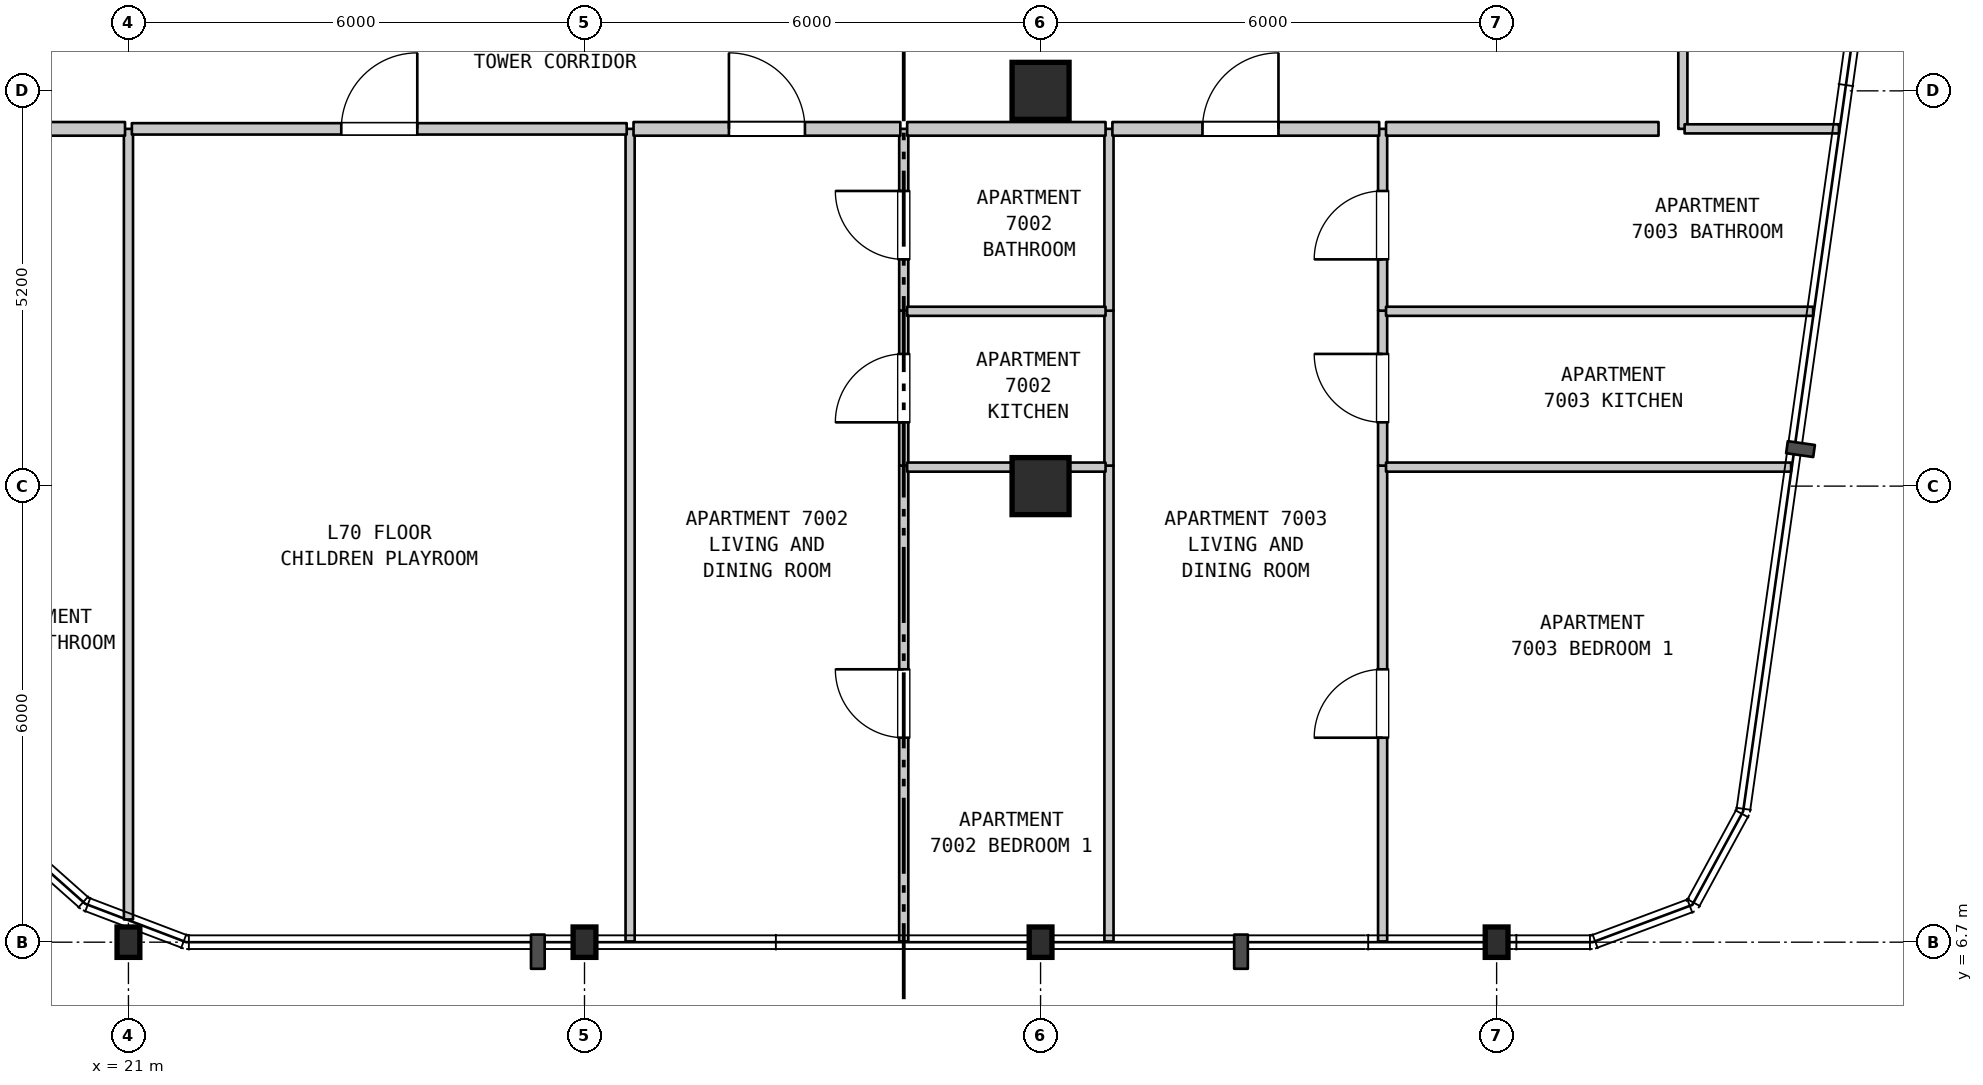
"""IFC4 building model, lengths in metres.
Left out: names, types, materials, properties, quantities, classifications, styles, units other than length and angle.
Written with IfcOpenShell. Run it as: python <this file> out.ifc"""

import sys

from ifc_helpers import new_model, si_unit, direction, frame, frame_2d, origin, origin_2d, place, context, subcontext, project, spatial, rectangle, i_section, extrude, element, fill, save


model = new_model("IFC4")
c1 = context("Model", 3, precision=1e-05, world=origin(), true_north=direction((0.0, 1.0)))
c2 = subcontext(c1, "Body", "Model", "MODEL_VIEW")
j1 = project(units=[si_unit("LENGTHUNIT", "METRE"), si_unit("PLANEANGLEUNIT", "RADIAN")], contexts=[c1])
p1 = place(None, origin())
s1 = spatial("IfcSite", under=j1, at=p1, CompositionType="ELEMENT")
p2 = place(p1, origin())
s2 = spatial("IfcBuilding", under=s1, at=p2, CompositionType="ELEMENT")
p3 = place(p2, frame((0.0, 0.0, 280.6)))
s3 = spatial("IfcBuildingStorey", under=s2, at=p3, CompositionType="ELEMENT", Elevation=280.6)
for number, where, z_axis, x_axis in (
    (1, (21.0, 6.7, 0.0), (0.0, 0.0, 1.0), (1.0, 0.0, 0.0)),
    (2, (27.0, 6.7, 0.0), (0.0, 0.0, 1.0), (1.0, 0.0, 0.0)),
    (3, (33.0, 6.7, 0.0), (0.0, 0.0, 1.0), (1.0, 0.0, 0.0)),
):
    element("IfcColumn", number, at=place(p3, frame(where, z_axis=z_axis, x_axis=x_axis)), inside=s3, PredefinedType="COLUMN", context=c2, shape_type="SweptSolid", body=[
        extrude(i_section(OverallWidth=0.3, OverallDepth=0.4, WebThickness=0.013, FlangeThickness=0.024, FilletRadius=0.027, at=origin_2d()), origin(), (0.0, 0.0, 1.0), 3.7),
    ])
for number, where, z_axis, x_axis in (
    (4, (33.0, 12.7, 0.0), (0.0, 0.0, 1.0), (1.0, 0.0, 0.0)),
    (5, (33.0, 17.9, 0.0), (0.0, 0.0, 1.0), (1.0, 0.0, 0.0)),
):
    element("IfcColumn", number, at=place(p3, frame(where, z_axis=z_axis, x_axis=x_axis)), inside=s3, PredefinedType="COLUMN", context=c2, shape_type="SweptSolid", body=[
        extrude(rectangle(XDim=0.75, YDim=0.75, at=origin_2d()), origin(), (0.0, 0.0, 1.0), 3.7),
    ])
p4 = place(p3, frame((39.0, 6.7, 0.0), z_axis=(0.0, 0.0, 1.0), x_axis=(1.0, 0.0, 0.0)))
e6 = element("IfcColumn", 6, at=p4, inside=s3, PredefinedType="COLUMN", context=c2, shape_type="SweptSolid", body=[
    extrude(i_section(OverallWidth=0.3, OverallDepth=0.4, WebThickness=0.013, FlangeThickness=0.024, FilletRadius=0.027, at=origin_2d()), origin(), (0.0, 0.0, 1.0), 3.7),
])
p5 = place(p3, frame((21.0, 6.999, 0.0), z_axis=(0.0, 0.0, 1.0), x_axis=(0.0, 1.0, 0.0)))
e7 = element("IfcWall", 7, at=p5, inside=s3, PredefinedType="PARTITIONING", context=c2, shape_type="SweptSolid", body=[
    extrude(rectangle(XDim=10.401, YDim=0.12, at=frame_2d((5.2, 0.0))), origin(), (0.0, 0.0, 1.0), 3.39),
])
p6 = place(p3, frame((27.6, 6.71, 0.0), z_axis=(0.0, 0.0, 1.0), x_axis=(0.0, 1.0, 0.0)))
e8 = element("IfcWall", 8, at=p6, inside=s3, PredefinedType="PARTITIONING", context=c2, shape_type="SweptSolid", body=[
    extrude(rectangle(XDim=10.69, YDim=0.12, at=frame_2d((5.345, 0.0))), origin(), (0.0, 0.0, 1.0), 3.39),
])
p7 = place(p3, frame((31.2, 6.71, 0.0), z_axis=(0.0, 0.0, 1.0), x_axis=(0.0, 1.0, 0.0)))
e9 = element("IfcWall", 9, at=p7, inside=s3, PredefinedType="PARTITIONING", context=c2, shape_type="SweptSolid", body=[
    extrude(rectangle(XDim=6.26, YDim=0.12, at=frame_2d((3.13, 0.0))), origin(), (0.0, 0.0, 1.0), 3.39),
])
p8 = place(p7, frame((2.68, 0.0, 0.0)))
e10 = element("IfcOpeningElement", 10, at=p8, cuts=e9, PredefinedType="OPENING", context=c2, shape_type="SweptSolid", body=[
    extrude(rectangle(XDim=0.9, YDim=2.15, at=frame_2d((0.45, 1.075))), frame((0.0, 0.07, 0.0), z_axis=(0.0, -1.0, 0.0), x_axis=(1.0, 0.0, 0.0)), (0.0, 0.0, 1.0), 0.14),
])
p9 = place(p3, frame((31.2, 12.97, 0.0), z_axis=(0.0, 0.0, 1.0), x_axis=(0.0, 1.0, 0.0)))
e11 = element("IfcWall", 11, at=p9, inside=s3, PredefinedType="PARTITIONING", context=c2, shape_type="SweptSolid", body=[
    extrude(rectangle(XDim=2.038, YDim=0.12, at=frame_2d((1.019, 0.0))), origin(), (0.0, 0.0, 1.0), 3.39),
])
p10 = place(p9, frame((0.569, 0.0, 0.0)))
e12 = element("IfcOpeningElement", 12, at=p10, cuts=e11, PredefinedType="OPENING", context=c2, shape_type="SweptSolid", body=[
    extrude(rectangle(XDim=0.9, YDim=2.15, at=frame_2d((0.45, 1.075))), frame((0.0, 0.07, 0.0), z_axis=(0.0, -1.0, 0.0), x_axis=(1.0, 0.0, 0.0)), (0.0, 0.0, 1.0), 0.14),
])
p11 = place(p3, frame((31.2, 15.008, 0.0), z_axis=(0.0, 0.0, 1.0), x_axis=(0.0, 1.0, 0.0)))
e13 = element("IfcWall", 13, at=p11, inside=s3, PredefinedType="PARTITIONING", context=c2, shape_type="SweptSolid", body=[
    extrude(rectangle(XDim=2.392, YDim=0.12, at=frame_2d((1.196, 0.0))), origin(), (0.0, 0.0, 1.0), 3.39),
])
p12 = place(p11, frame((0.675, 0.0, 0.0)))
e14 = element("IfcOpeningElement", 14, at=p12, cuts=e13, PredefinedType="OPENING", context=c2, shape_type="SweptSolid", body=[
    extrude(rectangle(XDim=0.9, YDim=2.1, at=frame_2d((0.45, 1.05))), frame((0.0, 0.07, 0.0), z_axis=(0.0, -1.0, 0.0), x_axis=(1.0, 0.0, 0.0)), (0.0, 0.0, 1.0), 0.14),
])
p13 = place(p3, frame((33.9, 6.71, 0.0), z_axis=(0.0, 0.0, 1.0), x_axis=(0.0, 1.0, 0.0)))
e15 = element("IfcWall", 15, at=p13, inside=s3, PredefinedType="PARTITIONING", context=c2, shape_type="SweptSolid", body=[
    extrude(rectangle(XDim=6.26, YDim=0.12, at=frame_2d((3.13, 0.0))), origin(), (0.0, 0.0, 1.0), 3.39),
])
p14 = place(p3, frame((33.9, 12.97, 0.0), z_axis=(0.0, 0.0, 1.0), x_axis=(0.0, 1.0, 0.0)))
e16 = element("IfcWall", 16, at=p14, inside=s3, PredefinedType="PARTITIONING", context=c2, shape_type="SweptSolid", body=[
    extrude(rectangle(XDim=2.038, YDim=0.12, at=frame_2d((1.019, 0.0))), origin(), (0.0, 0.0, 1.0), 3.39),
])
p15 = place(p3, frame((33.9, 15.008, 0.0), z_axis=(0.0, 0.0, 1.0), x_axis=(0.0, 1.0, 0.0)))
e17 = element("IfcWall", 17, at=p15, inside=s3, PredefinedType="PARTITIONING", context=c2, shape_type="SweptSolid", body=[
    extrude(rectangle(XDim=2.392, YDim=0.12, at=frame_2d((1.196, 0.0))), origin(), (0.0, 0.0, 1.0), 3.39),
])
p16 = place(p3, frame((37.5, 6.71, 0.0), z_axis=(0.0, 0.0, 1.0), x_axis=(0.0, 1.0, 0.0)))
e18 = element("IfcWall", 18, at=p16, inside=s3, PredefinedType="PARTITIONING", context=c2, shape_type="SweptSolid", body=[
    extrude(rectangle(XDim=6.26, YDim=0.12, at=frame_2d((3.13, 0.0))), origin(), (0.0, 0.0, 1.0), 3.39),
])
p17 = place(p16, frame((2.68, 0.0, 0.0)))
e19 = element("IfcOpeningElement", 19, at=p17, cuts=e18, PredefinedType="OPENING", context=c2, shape_type="SweptSolid", body=[
    extrude(rectangle(XDim=0.9, YDim=2.15, at=frame_2d((0.45, 1.075))), frame((0.0, 0.07, 0.0), z_axis=(0.0, -1.0, 0.0), x_axis=(1.0, 0.0, 0.0)), (0.0, 0.0, 1.0), 0.14),
])
p18 = place(p3, frame((37.5, 12.97, 0.0), z_axis=(0.0, 0.0, 1.0), x_axis=(0.0, 1.0, 0.0)))
e20 = element("IfcWall", 20, at=p18, inside=s3, PredefinedType="PARTITIONING", context=c2, shape_type="SweptSolid", body=[
    extrude(rectangle(XDim=2.038, YDim=0.12, at=frame_2d((1.019, 0.0))), origin(), (0.0, 0.0, 1.0), 3.39),
])
p19 = place(p18, frame((0.569, 0.0, 0.0)))
e21 = element("IfcOpeningElement", 21, at=p19, cuts=e20, PredefinedType="OPENING", context=c2, shape_type="SweptSolid", body=[
    extrude(rectangle(XDim=0.9, YDim=2.15, at=frame_2d((0.45, 1.075))), frame((0.0, 0.07, 0.0), z_axis=(0.0, -1.0, 0.0), x_axis=(1.0, 0.0, 0.0)), (0.0, 0.0, 1.0), 0.14),
])
p20 = place(p3, frame((37.5, 15.008, 0.0), z_axis=(0.0, 0.0, 1.0), x_axis=(0.0, 1.0, 0.0)))
e22 = element("IfcWall", 22, at=p20, inside=s3, PredefinedType="PARTITIONING", context=c2, shape_type="SweptSolid", body=[
    extrude(rectangle(XDim=2.392, YDim=0.12, at=frame_2d((1.196, 0.0))), origin(), (0.0, 0.0, 1.0), 3.39),
])
p21 = place(p20, frame((0.675, 0.0, 0.0)))
e23 = element("IfcOpeningElement", 23, at=p21, cuts=e22, PredefinedType="OPENING", context=c2, shape_type="SweptSolid", body=[
    extrude(rectangle(XDim=0.9, YDim=2.1, at=frame_2d((0.45, 1.05))), frame((0.0, 0.07, 0.0), z_axis=(0.0, -1.0, 0.0), x_axis=(1.0, 0.0, 0.0)), (0.0, 0.0, 1.0), 0.14),
])
p22 = place(p3, frame((41.45, 17.4, 0.0), z_axis=(0.0, 0.0, 1.0), x_axis=(0.0, 1.0, 0.0)))
e24 = element("IfcWall", 24, at=p22, inside=s3, PredefinedType="PARTITIONING", context=c2, shape_type="SweptSolid", body=[
    extrude(rectangle(XDim=2.099, YDim=0.12, at=frame_2d((1.05, 0.0))), origin(), (0.0, 0.0, 1.0), 3.39),
])
p23 = place(p3, frame((31.245, 12.95, 0.0), z_axis=(0.0, 0.0, 1.0), x_axis=(1.0, 0.0, 0.0)))
e25 = element("IfcWall", 25, at=p23, inside=s3, PredefinedType="PARTITIONING", context=c2, shape_type="SweptSolid", body=[
    extrude(rectangle(XDim=2.61, YDim=0.12, at=frame_2d((1.305, 0.0))), origin(), (0.0, 0.0, 1.0), 3.39),
])
p24 = place(p3, frame((37.545, 12.95, 0.0), z_axis=(0.0, 0.0, 1.0), x_axis=(1.0, 0.0, 0.0)))
e26 = element("IfcWall", 26, at=p24, inside=s3, PredefinedType="PARTITIONING", context=c2, shape_type="SweptSolid", body=[
    extrude(rectangle(XDim=5.329, YDim=0.12, at=frame_2d((2.665, 0.0))), origin(), (0.0, 0.0, 1.0), 3.39),
])
p25 = place(p3, frame((31.245, 15.0, 0.0), z_axis=(0.0, 0.0, 1.0), x_axis=(1.0, 0.0, 0.0)))
e27 = element("IfcWall", 27, at=p25, inside=s3, PredefinedType="PARTITIONING", context=c2, shape_type="SweptSolid", body=[
    extrude(rectangle(XDim=2.61, YDim=0.12, at=frame_2d((1.305, 0.0))), origin(), (0.0, 0.0, 1.0), 3.39),
])
p26 = place(p3, frame((37.545, 15.0, 0.0), z_axis=(0.0, 0.0, 1.0), x_axis=(1.0, 0.0, 0.0)))
e28 = element("IfcWall", 28, at=p26, inside=s3, PredefinedType="PARTITIONING", context=c2, shape_type="SweptSolid", body=[
    extrude(rectangle(XDim=5.619, YDim=0.12, at=frame_2d((2.81, 0.0))), origin(), (0.0, 0.0, 1.0), 3.39),
])
p27 = place(p3, frame((19.095, 17.4, 0.0), z_axis=(0.0, 0.0, 1.0), x_axis=(1.0, 0.0, 0.0)))
e29 = element("IfcWall", 29, at=p27, inside=s3, PredefinedType="STANDARD", context=c2, shape_type="SweptSolid", body=[
    extrude(rectangle(XDim=1.86, YDim=0.18, at=frame_2d((0.93, 0.0))), origin(), (0.0, 0.0, 1.0), 3.39),
])
p28 = place(p3, frame((21.045, 17.4, 0.0), z_axis=(0.0, 0.0, 1.0), x_axis=(1.0, 0.0, 0.0)))
e30 = element("IfcWall", 30, at=p28, inside=s3, PredefinedType="STANDARD", context=c2, shape_type="SweptSolid", body=[
    extrude(rectangle(XDim=6.51, YDim=0.15, at=frame_2d((3.255, 0.0))), origin(), (0.0, 0.0, 1.0), 3.39),
])
p29 = place(p28, frame((2.755, 0.0, 0.0)))
e31 = element("IfcOpeningElement", 31, at=p29, cuts=e30, PredefinedType="OPENING", context=c2, shape_type="SweptSolid", body=[
    extrude(rectangle(XDim=1.0, YDim=2.15, at=frame_2d((0.5, 1.075))), frame((0.0, 0.085, 0.0), z_axis=(0.0, -1.0, 0.0), x_axis=(1.0, 0.0, 0.0)), (0.0, 0.0, 1.0), 0.17),
])
p30 = place(p3, frame((27.645, 17.4, 0.0), z_axis=(0.0, 0.0, 1.0), x_axis=(1.0, 0.0, 0.0)))
e32 = element("IfcWall", 32, at=p30, inside=s3, PredefinedType="STANDARD", context=c2, shape_type="SweptSolid", body=[
    extrude(rectangle(XDim=3.51, YDim=0.18, at=frame_2d((1.755, 0.0))), origin(), (0.0, 0.0, 1.0), 3.39),
])
p31 = place(p30, frame((1.255, 0.0, 0.0)))
e33 = element("IfcOpeningElement", 33, at=p31, cuts=e32, PredefinedType="OPENING", context=c2, shape_type="SweptSolid", body=[
    extrude(rectangle(XDim=1.0, YDim=2.15, at=frame_2d((0.5, 1.075))), frame((0.0, 0.1, 0.0), z_axis=(0.0, -1.0, 0.0), x_axis=(1.0, 0.0, 0.0)), (0.0, 0.0, 1.0), 0.2),
])
p32 = place(p3, frame((31.245, 17.4, 0.0), z_axis=(0.0, 0.0, 1.0), x_axis=(1.0, 0.0, 0.0)))
e34 = element("IfcWall", 34, at=p32, inside=s3, PredefinedType="STANDARD", context=c2, shape_type="SweptSolid", body=[
    extrude(rectangle(XDim=2.61, YDim=0.18, at=frame_2d((1.305, 0.0))), origin(), (0.0, 0.0, 1.0), 3.39),
])
p33 = place(p3, frame((33.945, 17.4, 0.0), z_axis=(0.0, 0.0, 1.0), x_axis=(1.0, 0.0, 0.0)))
e35 = element("IfcWall", 35, at=p33, inside=s3, PredefinedType="STANDARD", context=c2, shape_type="SweptSolid", body=[
    extrude(rectangle(XDim=3.51, YDim=0.18, at=frame_2d((1.755, 0.0))), origin(), (0.0, 0.0, 1.0), 3.39),
])
p34 = place(p33, frame((1.185, 0.0, 0.0)))
e36 = element("IfcOpeningElement", 36, at=p34, cuts=e35, PredefinedType="OPENING", context=c2, shape_type="SweptSolid", body=[
    extrude(rectangle(XDim=1.0, YDim=2.15, at=frame_2d((0.5, 1.075))), frame((0.0, 0.1, 0.0), z_axis=(0.0, -1.0, 0.0), x_axis=(1.0, 0.0, 0.0)), (0.0, 0.0, 1.0), 0.2),
])
p35 = place(p3, frame((37.545, 17.4, 0.0), z_axis=(0.0, 0.0, 1.0), x_axis=(1.0, 0.0, 0.0)))
e37 = element("IfcWall", 37, at=p35, inside=s3, PredefinedType="STANDARD", context=c2, shape_type="SweptSolid", body=[
    extrude(rectangle(XDim=3.585, YDim=0.18, at=frame_2d((1.792, 0.0))), origin(), (0.0, 0.0, 1.0), 3.39),
])
p36 = place(p3, frame((41.473, 17.4, 0.0), z_axis=(0.0, 0.0, 1.0), x_axis=(1.0, 0.0, 0.0)))
e38 = element("IfcWall", 38, at=p36, inside=s3, PredefinedType="PARTITIONING", context=c2, shape_type="SweptSolid", body=[
    extrude(rectangle(XDim=2.031, YDim=0.12, at=frame_2d((1.016, 0.0))), origin(), (0.0, 0.0, 1.0), 3.39),
])
p37 = place(p8, origin())
e39 = element("IfcDoor", 39, at=p37, inside=s3, OperationType="SINGLE_SWING_RIGHT", PredefinedType="DOOR", context=c2, shape_type="SweptSolid", body=[
    extrude(rectangle(XDim=0.9, YDim=2.15, at=frame_2d((0.45, 1.075))), frame((0.0, 0.025, 0.0), z_axis=(0.0, -1.0, 0.0), x_axis=(1.0, 0.0, 0.0)), (0.0, 0.0, 1.0), 0.05),
])
fill(e10, e39)
p38 = place(p10, origin())
e40 = element("IfcDoor", 40, at=p38, inside=s3, OperationType="SINGLE_SWING_LEFT", PredefinedType="DOOR", context=c2, shape_type="SweptSolid", body=[
    extrude(rectangle(XDim=0.9, YDim=2.15, at=frame_2d((0.45, 1.075))), frame((0.0, 0.025, 0.0), z_axis=(0.0, -1.0, 0.0), x_axis=(1.0, 0.0, 0.0)), (0.0, 0.0, 1.0), 0.05),
])
fill(e12, e40)
p39 = place(p12, origin())
e41 = element("IfcDoor", 41, at=p39, inside=s3, OperationType="SINGLE_SWING_RIGHT", PredefinedType="DOOR", context=c2, shape_type="SweptSolid", body=[
    extrude(rectangle(XDim=0.9, YDim=2.1, at=frame_2d((0.45, 1.05))), frame((0.0, 0.025, 0.0), z_axis=(0.0, -1.0, 0.0), x_axis=(1.0, 0.0, 0.0)), (0.0, 0.0, 1.0), 0.05),
])
fill(e14, e41)
p40 = place(p17, origin())
e42 = element("IfcDoor", 42, at=p40, inside=s3, OperationType="SINGLE_SWING_LEFT", PredefinedType="DOOR", context=c2, shape_type="SweptSolid", body=[
    extrude(rectangle(XDim=0.9, YDim=2.15, at=frame_2d((0.45, 1.075))), frame((0.0, 0.025, 0.0), z_axis=(0.0, -1.0, 0.0), x_axis=(1.0, 0.0, 0.0)), (0.0, 0.0, 1.0), 0.05),
])
fill(e19, e42)
p41 = place(p19, origin())
e43 = element("IfcDoor", 43, at=p41, inside=s3, OperationType="SINGLE_SWING_RIGHT", PredefinedType="DOOR", context=c2, shape_type="SweptSolid", body=[
    extrude(rectangle(XDim=0.9, YDim=2.15, at=frame_2d((0.45, 1.075))), frame((0.0, 0.025, 0.0), z_axis=(0.0, -1.0, 0.0), x_axis=(1.0, 0.0, 0.0)), (0.0, 0.0, 1.0), 0.05),
])
fill(e21, e43)
p42 = place(p21, origin())
e44 = element("IfcDoor", 44, at=p42, inside=s3, OperationType="SINGLE_SWING_LEFT", PredefinedType="DOOR", context=c2, shape_type="SweptSolid", body=[
    extrude(rectangle(XDim=0.9, YDim=2.1, at=frame_2d((0.45, 1.05))), frame((0.0, 0.025, 0.0), z_axis=(0.0, -1.0, 0.0), x_axis=(1.0, 0.0, 0.0)), (0.0, 0.0, 1.0), 0.05),
])
fill(e23, e44)
p43 = place(p29, origin())
e45 = element("IfcDoor", 45, at=p43, inside=s3, OperationType="SINGLE_SWING_RIGHT", PredefinedType="DOOR", context=c2, shape_type="SweptSolid", body=[
    extrude(rectangle(XDim=1.0, YDim=2.15, at=frame_2d((0.5, 1.075))), frame((0.0, 0.025, 0.0), z_axis=(0.0, -1.0, 0.0), x_axis=(1.0, 0.0, 0.0)), (0.0, 0.0, 1.0), 0.05),
])
fill(e31, e45)
p44 = place(p31, origin())
e46 = element("IfcDoor", 46, at=p44, inside=s3, OperationType="SINGLE_SWING_LEFT", PredefinedType="DOOR", context=c2, shape_type="SweptSolid", body=[
    extrude(rectangle(XDim=1.0, YDim=2.15, at=frame_2d((0.5, 1.075))), frame((0.0, 0.025, 0.0), z_axis=(0.0, -1.0, 0.0), x_axis=(1.0, 0.0, 0.0)), (0.0, 0.0, 1.0), 0.05),
])
fill(e33, e46)
p45 = place(p34, origin())
e47 = element("IfcDoor", 47, at=p45, inside=s3, OperationType="SINGLE_SWING_RIGHT", PredefinedType="DOOR", context=c2, shape_type="SweptSolid", body=[
    extrude(rectangle(XDim=1.0, YDim=2.15, at=frame_2d((0.5, 1.075))), frame((0.0, 0.025, 0.0), z_axis=(0.0, -1.0, 0.0), x_axis=(1.0, 0.0, 0.0)), (0.0, 0.0, 1.0), 0.05),
])
fill(e36, e47)
save(model, sys.argv[1])
